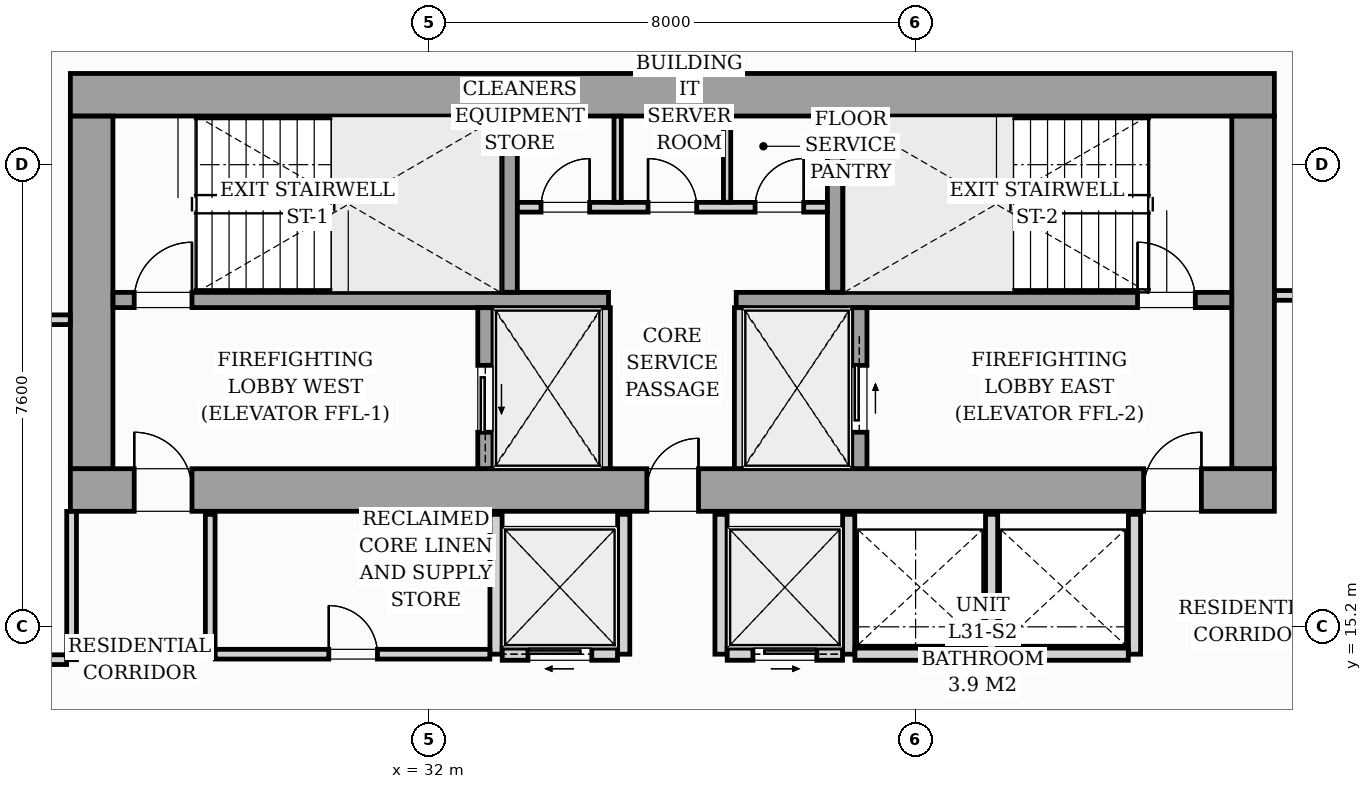
"""IFC4 building model, lengths in metres.
Left out: names, types, materials, properties, quantities, classifications, styles, units other than length and angle.
Written with IfcOpenShell. Run it as: python <this file> out.ifc"""

import sys

from ifc_helpers import new_model, si_unit, direction, frame, frame_2d, origin, origin_2d, place, context, subcontext, project, spatial, rectangle, i_section, extrude, source, transform, mapped, element, fill, save


model = new_model("IFC4")
c1 = context("Model", 3, precision=1e-05, world=origin(), true_north=direction((0.0, 1.0)))
c2 = subcontext(c1, "Body", "Model", "MODEL_VIEW")
j1 = project(units=[si_unit("LENGTHUNIT", "METRE"), si_unit("PLANEANGLEUNIT", "RADIAN")], contexts=[c1])
p1 = place(None, origin())
s1 = spatial("IfcSite", under=j1, at=p1, CompositionType="ELEMENT")
p2 = place(p1, origin())
s2 = spatial("IfcBuilding", under=s1, at=p2, CompositionType="ELEMENT")
p3 = place(p2, frame((0.0, 0.0, 109.8)))
s3 = spatial("IfcBuildingStorey", under=s2, at=p3, CompositionType="ELEMENT", Elevation=109.8)
m1 = source(origin(), c2, "Body", "SweptSolid", [
    extrude(i_section(OverallWidth=0.427, OverallDepth=0.483, WebThickness=0.051, FlangeThickness=0.082, FilletRadius=0.018, at=origin_2d()), origin(), (0.0, 0.0, 1.0), 3.196),
])
for number, where, z_axis, x_axis in (
    (1, (26.4, 17.4, 0.002), (0.0, 0.0, 1.0), (1.0, 0.0, 0.0)),
    (2, (33.12, 17.4, 0.002), (0.0, 0.0, 1.0), (1.0, 0.0, 0.0)),
    (3, (38.88, 17.4, 0.002), (0.0, 0.0, 1.0), (1.0, 0.0, 0.0)),
    (4, (45.6, 17.4, 0.002), (0.0, 0.0, 1.0), (1.0, 0.0, 0.0)),
    (5, (26.4, 24.0, 0.002), (0.0, 0.0, 1.0), (1.0, 0.0, 0.0)),
    (6, (33.12, 24.0, 0.002), (0.0, 0.0, 1.0), (1.0, 0.0, 0.0)),
    (7, (38.88, 24.0, 0.002), (0.0, 0.0, 1.0), (1.0, 0.0, 0.0)),
    (8, (45.6, 24.0, 0.002), (0.0, 0.0, 1.0), (1.0, 0.0, 0.0)),
):
    element("IfcColumn", number, at=place(p3, frame(where, z_axis=z_axis, x_axis=x_axis)), inside=s3, PredefinedType="PILASTER", context=c2, shape_type="MappedRepresentation", body=[
        mapped(m1, transform((0.0, 0.0, 0.0), scale=1.0)),
    ])
p4 = place(p3, frame((11.08, 23.508, 0.0), z_axis=(0.0, 0.0, 1.0), x_axis=(0.995396638587, 0.095841180552, 0.0)))
e9 = element("IfcWall", 9, at=p4, inside=s3, PredefinedType="STANDARD", context=c2, shape_type="SweptSolid", body=[
    extrude(rectangle(XDim=19.11, YDim=0.26, at=frame_2d((9.555, 0.0))), origin(), (0.0, 0.0, 1.0), 2.94),
])
p5 = place(p4, frame((10.764, 0.0, 0.0)))
e10 = element("IfcOpeningElement", 10, at=p5, cuts=e9, PredefinedType="OPENING", context=c2, shape_type="SweptSolid", body=[
    extrude(rectangle(XDim=1.8, YDim=2.06, at=frame_2d((0.9, 1.03))), frame((0.0, 0.14, 0.0), z_axis=(0.0, -1.0, 0.0), x_axis=(1.0, 0.0, 0.0)), (0.0, 0.0, 1.0), 0.28),
])
p6 = place(p4, frame((2.05, 0.0, 0.65)))
e11 = element("IfcOpeningElement", 11, at=p6, cuts=e9, PredefinedType="OPENING", context=c2, shape_type="SweptSolid", body=[
    extrude(rectangle(XDim=1.6, YDim=1.5, at=frame_2d((0.8, 0.75))), frame((0.0, 0.14, 0.0), z_axis=(0.0, -1.0, 0.0), x_axis=(1.0, 0.0, 0.0)), (0.0, 0.0, 1.0), 0.28),
])
p7 = place(p3, frame((26.1, 17.45, 0.0), z_axis=(0.0, 0.0, 1.0), x_axis=(1.0, 0.0, 0.0)))
e12 = element("IfcWall", 12, at=p7, inside=s3, PredefinedType="SHEAR", context=c2, shape_type="SweptSolid", body=[
    extrude(rectangle(XDim=19.8, YDim=0.7, at=frame_2d((9.9, 0.0))), origin(), (0.0, 0.0, 1.0), 3.2),
])
p8 = place(p7, frame((1.05, 0.0, 0.0)))
e13 = element("IfcOpeningElement", 13, at=p8, cuts=e12, PredefinedType="OPENING", context=c2, shape_type="SweptSolid", body=[
    extrude(rectangle(XDim=0.95, YDim=2.06, at=frame_2d((0.475, 1.03))), frame((0.0, 0.36, 0.0), z_axis=(0.0, -1.0, 0.0), x_axis=(1.0, 0.0, 0.0)), (0.0, 0.0, 1.0), 0.72),
])
p9 = place(p7, frame((9.48, 0.0, 0.0)))
e14 = element("IfcOpeningElement", 14, at=p9, cuts=e12, PredefinedType="OPENING", context=c2, shape_type="SweptSolid", body=[
    extrude(rectangle(XDim=0.85, YDim=2.0, at=frame_2d((0.425, 1.0))), frame((0.0, 0.36, 0.0), z_axis=(0.0, -1.0, 0.0), x_axis=(1.0, 0.0, 0.0)), (0.0, 0.0, 1.0), 0.72),
])
p10 = place(p7, frame((17.65, 0.0, 0.0)))
e15 = element("IfcOpeningElement", 15, at=p10, cuts=e12, PredefinedType="OPENING", context=c2, shape_type="SweptSolid", body=[
    extrude(rectangle(XDim=0.95, YDim=2.06, at=frame_2d((0.475, 1.03))), frame((0.0, 0.36, 0.0), z_axis=(0.0, -1.0, 0.0), x_axis=(1.0, 0.0, 0.0)), (0.0, 0.0, 1.0), 0.72),
])
p11 = place(p3, frame((26.1, 23.95, 0.0), z_axis=(0.0, 0.0, 1.0), x_axis=(1.0, 0.0, 0.0)))
e16 = element("IfcWall", 16, at=p11, inside=s3, PredefinedType="SHEAR", context=c2, shape_type="SweptSolid", body=[
    extrude(rectangle(XDim=19.8, YDim=0.7, at=frame_2d((9.9, 0.0))), origin(), (0.0, 0.0, 1.0), 3.2),
])
for number, where, z_axis, x_axis in (
    (17, (26.45, 17.802, 0.0), (0.0, 0.0, 1.0), (0.0, 1.0, 0.0)),
    (18, (45.55, 17.802, 0.0), (0.0, 0.0, 1.0), (0.0, 1.0, 0.0)),
):
    element("IfcWall", number, at=place(p3, frame(where, z_axis=z_axis, x_axis=x_axis)), inside=s3, PredefinedType="SHEAR", context=c2, shape_type="SweptSolid", body=[
        extrude(rectangle(XDim=5.796, YDim=0.7, at=frame_2d((2.898, 0.0))), origin(), (0.0, 0.0, 1.0), 3.2),
    ])
p12 = place(p3, frame((26.802, 20.575, 0.0), z_axis=(0.0, 0.0, 1.0), x_axis=(1.0, 0.0, 0.0)))
e19 = element("IfcWall", 19, at=p12, inside=s3, PredefinedType="SOLIDWALL", context=c2, shape_type="SweptSolid", body=[
    extrude(rectangle(XDim=8.148, YDim=0.25, at=frame_2d((4.074, 0.0))), origin(), (0.0, 0.0, 1.0), 3.2),
])
p13 = place(p12, frame((0.348, 0.0, 0.0)))
e20 = element("IfcOpeningElement", 20, at=p13, cuts=e19, PredefinedType="OPENING", context=c2, shape_type="SweptSolid", body=[
    extrude(rectangle(XDim=0.95, YDim=2.06, at=frame_2d((0.475, 1.03))), frame((0.0, 0.135, 0.0), z_axis=(0.0, -1.0, 0.0), x_axis=(1.0, 0.0, 0.0)), (0.0, 0.0, 1.0), 0.27),
])
p14 = place(p3, frame((37.05, 20.575, 0.0), z_axis=(0.0, 0.0, 1.0), x_axis=(1.0, 0.0, 0.0)))
e21 = element("IfcWall", 21, at=p14, inside=s3, PredefinedType="SOLIDWALL", context=c2, shape_type="SweptSolid", body=[
    extrude(rectangle(XDim=8.148, YDim=0.25, at=frame_2d((4.074, 0.0))), origin(), (0.0, 0.0, 1.0), 3.2),
])
p15 = place(p14, frame((6.6, 0.0, 0.0)))
e22 = element("IfcOpeningElement", 22, at=p15, cuts=e21, PredefinedType="OPENING", context=c2, shape_type="SweptSolid", body=[
    extrude(rectangle(XDim=0.95, YDim=2.06, at=frame_2d((0.475, 1.03))), frame((0.0, 0.135, 0.0), z_axis=(0.0, -1.0, 0.0), x_axis=(1.0, 0.0, 0.0)), (0.0, 0.0, 1.0), 0.27),
])
for number, where, z_axis, x_axis in (
    (23, (33.325, 20.702, 0.0), (0.0, 0.0, 1.0), (0.0, 1.0, 0.0)),
    (24, (38.675, 20.702, 0.0), (0.0, 0.0, 1.0), (0.0, 1.0, 0.0)),
):
    element("IfcWall", number, at=place(p3, frame(where, z_axis=z_axis, x_axis=x_axis)), inside=s3, PredefinedType="SOLIDWALL", context=c2, shape_type="SweptSolid", body=[
        extrude(rectangle(XDim=2.896, YDim=0.25, at=frame_2d((1.448, 0.0))), origin(), (0.0, 0.0, 1.0), 3.2),
    ])
p16 = place(p3, frame((32.925, 17.802, 0.0), z_axis=(0.0, 0.0, 1.0), x_axis=(0.0, 1.0, 0.0)))
e25 = element("IfcWall", 25, at=p16, inside=s3, PredefinedType="SOLIDWALL", context=c2, shape_type="SweptSolid", body=[
    extrude(rectangle(XDim=2.646, YDim=0.25, at=frame_2d((1.323, 0.0))), origin(), (0.0, 0.0, 1.0), 3.2),
])
p17 = place(p16, frame((0.598, 0.0, 0.0)))
e26 = element("IfcOpeningElement", 26, at=p17, cuts=e25, PredefinedType="OPENING", context=c2, shape_type="SweptSolid", body=[
    extrude(rectangle(XDim=1.1, YDim=2.08, at=frame_2d((0.55, 1.04))), frame((0.0, 0.135, 0.0), z_axis=(0.0, -1.0, 0.0), x_axis=(1.0, 0.0, 0.0)), (0.0, 0.0, 1.0), 0.27),
])
for number, where, z_axis, x_axis in (
    (27, (34.9, 17.802, 0.0), (0.0, 0.0, 1.0), (0.0, 1.0, 0.0)),
    (28, (37.1, 17.802, 0.0), (0.0, 0.0, 1.0), (0.0, 1.0, 0.0)),
):
    element("IfcWall", number, at=place(p3, frame(where, z_axis=z_axis, x_axis=x_axis)), inside=s3, PredefinedType="PARTITIONING", context=c2, shape_type="SweptSolid", body=[
        extrude(rectangle(XDim=2.646, YDim=0.16, at=frame_2d((1.323, 0.0))), origin(), (0.0, 0.0, 1.0), 2.94),
    ])
p18 = place(p3, frame((39.075, 17.802, 0.0), z_axis=(0.0, 0.0, 1.0), x_axis=(0.0, 1.0, 0.0)))
e29 = element("IfcWall", 29, at=p18, inside=s3, PredefinedType="SOLIDWALL", context=c2, shape_type="SweptSolid", body=[
    extrude(rectangle(XDim=2.646, YDim=0.25, at=frame_2d((1.323, 0.0))), origin(), (0.0, 0.0, 1.0), 3.2),
])
p19 = place(p18, frame((0.598, 0.0, 0.0)))
e30 = element("IfcOpeningElement", 30, at=p19, cuts=e29, PredefinedType="OPENING", context=c2, shape_type="SweptSolid", body=[
    extrude(rectangle(XDim=1.1, YDim=2.08, at=frame_2d((0.55, 1.04))), frame((0.0, 0.135, 0.0), z_axis=(0.0, -1.0, 0.0), x_axis=(1.0, 0.0, 0.0)), (0.0, 0.0, 1.0), 0.27),
])
p20 = place(p3, frame((33.452, 22.1, 0.0), z_axis=(0.0, 0.0, 1.0), x_axis=(1.0, 0.0, 0.0)))
e31 = element("IfcWall", 31, at=p20, inside=s3, PredefinedType="PARTITIONING", context=c2, shape_type="SweptSolid", body=[
    extrude(rectangle(XDim=5.096, YDim=0.16, at=frame_2d((2.548, 0.0))), origin(), (0.0, 0.0, 1.0), 2.94),
])
p21 = place(p20, frame((0.388, 0.0, 0.0)))
e32 = element("IfcOpeningElement", 32, at=p21, cuts=e31, PredefinedType="OPENING", context=c2, shape_type="SweptSolid", body=[
    extrude(rectangle(XDim=0.8, YDim=2.05, at=frame_2d((0.4, 1.025))), frame((0.0, 0.09, 0.0), z_axis=(0.0, -1.0, 0.0), x_axis=(1.0, 0.0, 0.0)), (0.0, 0.0, 1.0), 0.18),
])
p22 = place(p20, frame((2.148, 0.0, 0.0)))
e33 = element("IfcOpeningElement", 33, at=p22, cuts=e31, PredefinedType="OPENING", context=c2, shape_type="SweptSolid", body=[
    extrude(rectangle(XDim=0.8, YDim=2.05, at=frame_2d((0.4, 1.025))), frame((0.0, 0.09, 0.0), z_axis=(0.0, -1.0, 0.0), x_axis=(1.0, 0.0, 0.0)), (0.0, 0.0, 1.0), 0.18),
])
p23 = place(p20, frame((3.908, 0.0, 0.0)))
e34 = element("IfcOpeningElement", 34, at=p23, cuts=e31, PredefinedType="OPENING", context=c2, shape_type="SweptSolid", body=[
    extrude(rectangle(XDim=0.8, YDim=2.05, at=frame_2d((0.4, 1.025))), frame((0.0, 0.09, 0.0), z_axis=(0.0, -1.0, 0.0), x_axis=(1.0, 0.0, 0.0)), (0.0, 0.0, 1.0), 0.18),
])
for number, where, z_axis, x_axis in (
    (35, (35.1, 22.182, 0.0), (0.0, 0.0, 1.0), (0.0, 1.0, 0.0)),
    (36, (36.9, 22.182, 0.0), (0.0, 0.0, 1.0), (0.0, 1.0, 0.0)),
):
    element("IfcWall", number, at=place(p3, frame(where, z_axis=z_axis, x_axis=x_axis)), inside=s3, PredefinedType="PARTITIONING", context=c2, shape_type="SweptSolid", body=[
        extrude(rectangle(XDim=1.416, YDim=0.12, at=frame_2d((0.708, 0.0))), origin(), (0.0, 0.0, 1.0), 2.94),
    ])
p24 = place(p3, frame((28.4, 14.75, 0.0), z_axis=(0.0, 0.0, 1.0), x_axis=(0.0, 1.0, 0.0)))
e37 = element("IfcWall", 37, at=p24, inside=s3, PredefinedType="PARTITIONING", context=c2, shape_type="SweptSolid", body=[
    extrude(rectangle(XDim=2.3, YDim=0.16, at=frame_2d((1.15, 0.0))), origin(), (0.0, 0.0, 1.0), 2.94),
])
p25 = place(p3, frame((33.1, 14.75, 0.0), z_axis=(0.0, 0.0, 1.0), x_axis=(0.0, 1.0, 0.0)))
e38 = element("IfcWall", 38, at=p25, inside=s3, PredefinedType="PARTITIONING", context=c2, shape_type="SweptSolid", body=[
    extrude(rectangle(XDim=2.3, YDim=0.2, at=frame_2d((1.15, 0.0))), origin(), (0.0, 0.0, 1.0), 2.94),
])
p26 = place(p3, frame((28.482, 14.75, 0.0), z_axis=(0.0, 0.0, 1.0), x_axis=(1.0, 0.0, 0.0)))
e39 = element("IfcWall", 39, at=p26, inside=s3, PredefinedType="PARTITIONING", context=c2, shape_type="SweptSolid", body=[
    extrude(rectangle(XDim=4.516, YDim=0.16, at=frame_2d((2.258, 0.0))), origin(), (0.0, 0.0, 1.0), 2.94),
])
p27 = place(p26, frame((1.868, 0.0, 0.0)))
e40 = element("IfcOpeningElement", 40, at=p27, cuts=e39, PredefinedType="OPENING", context=c2, shape_type="SweptSolid", body=[
    extrude(rectangle(XDim=0.8, YDim=2.05, at=frame_2d((0.4, 1.025))), frame((0.0, 0.09, 0.0), z_axis=(0.0, -1.0, 0.0), x_axis=(1.0, 0.0, 0.0)), (0.0, 0.0, 1.0), 0.18),
])
p28 = place(p3, frame((35.2, 14.75, 0.0), z_axis=(0.0, 0.0, 1.0), x_axis=(0.0, 1.0, 0.0)))
e41 = element("IfcWall", 41, at=p28, inside=s3, PredefinedType="PARTITIONING", context=c2, shape_type="SweptSolid", body=[
    extrude(rectangle(XDim=2.3, YDim=0.2, at=frame_2d((1.15, 0.0))), origin(), (0.0, 0.0, 1.0), 2.94),
])
p29 = place(p3, frame((33.202, 14.75, 0.0), z_axis=(0.0, 0.0, 1.0), x_axis=(1.0, 0.0, 0.0)))
e42 = element("IfcWall", 42, at=p29, inside=s3, PredefinedType="PARTITIONING", context=c2, shape_type="SweptSolid", body=[
    extrude(rectangle(XDim=1.896, YDim=0.2, at=frame_2d((0.948, 0.0))), origin(), (0.0, 0.0, 1.0), 2.94),
])
p30 = place(p29, frame((0.423, 0.0, 0.0)))
e43 = element("IfcOpeningElement", 43, at=p30, cuts=e42, PredefinedType="OPENING", context=c2, shape_type="SweptSolid", body=[
    extrude(rectangle(XDim=1.05, YDim=2.08, at=frame_2d((0.525, 1.04))), frame((0.0, 0.11, 0.0), z_axis=(0.0, -1.0, 0.0), x_axis=(1.0, 0.0, 0.0)), (0.0, 0.0, 1.0), 0.22),
])
for number, where, z_axis, x_axis in (
    (44, (36.8, 14.75, 0.0), (0.0, 0.0, 1.0), (0.0, 1.0, 0.0)),
    (45, (38.9, 14.75, 0.0), (0.0, 0.0, 1.0), (0.0, 1.0, 0.0)),
):
    element("IfcWall", number, at=place(p3, frame(where, z_axis=z_axis, x_axis=x_axis)), inside=s3, PredefinedType="PARTITIONING", context=c2, shape_type="SweptSolid", body=[
        extrude(rectangle(XDim=2.3, YDim=0.2, at=frame_2d((1.15, 0.0))), origin(), (0.0, 0.0, 1.0), 2.94),
    ])
p31 = place(p3, frame((36.902, 14.75, 0.0), z_axis=(0.0, 0.0, 1.0), x_axis=(1.0, 0.0, 0.0)))
e46 = element("IfcWall", 46, at=p31, inside=s3, PredefinedType="PARTITIONING", context=c2, shape_type="SweptSolid", body=[
    extrude(rectangle(XDim=1.896, YDim=0.2, at=frame_2d((0.948, 0.0))), origin(), (0.0, 0.0, 1.0), 2.94),
])
p32 = place(p31, frame((0.423, 0.0, 0.0)))
e47 = element("IfcOpeningElement", 47, at=p32, cuts=e46, PredefinedType="OPENING", context=c2, shape_type="SweptSolid", body=[
    extrude(rectangle(XDim=1.05, YDim=2.08, at=frame_2d((0.525, 1.04))), frame((0.0, 0.11, 0.0), z_axis=(0.0, -1.0, 0.0), x_axis=(1.0, 0.0, 0.0)), (0.0, 0.0, 1.0), 0.22),
])
for number, where, z_axis, x_axis in (
    (48, (41.25, 14.75, 0.0), (0.0, 0.0, 1.0), (0.0, 1.0, 0.0)),
    (49, (43.6, 14.75, 0.0), (0.0, 0.0, 1.0), (0.0, 1.0, 0.0)),
):
    element("IfcWall", number, at=place(p3, frame(where, z_axis=z_axis, x_axis=x_axis)), inside=s3, PredefinedType="PARTITIONING", context=c2, shape_type="SweptSolid", body=[
        extrude(rectangle(XDim=2.3, YDim=0.2, at=frame_2d((1.15, 0.0))), origin(), (0.0, 0.0, 1.0), 2.94),
    ])
for number, where, z_axis, x_axis in (
    (50, (39.002, 14.75, 0.0), (0.0, 0.0, 1.0), (1.0, 0.0, 0.0)),
    (51, (41.352, 14.75, 0.0), (0.0, 0.0, 1.0), (1.0, 0.0, 0.0)),
):
    element("IfcWall", number, at=place(p3, frame(where, z_axis=z_axis, x_axis=x_axis)), inside=s3, PredefinedType="PARTITIONING", context=c2, shape_type="SweptSolid", body=[
        extrude(rectangle(XDim=2.146, YDim=0.2, at=frame_2d((1.073, 0.0))), origin(), (0.0, 0.0, 1.0), 2.94),
    ])
p33 = place(p3, frame((36.0, 24.302, 0.0), z_axis=(0.0, 0.0, 1.0), x_axis=(0.0, 1.0, 0.0)))
e52 = element("IfcWall", 52, at=p33, inside=s3, PredefinedType="PARTITIONING", context=c2, shape_type="SweptSolid", body=[
    extrude(rectangle(XDim=1.656, YDim=0.2, at=frame_2d((0.828, 0.0))), origin(), (0.0, 0.0, 1.0), 2.94),
])
p34 = place(p3, frame((45.902, 20.65, 0.0), z_axis=(0.0, 0.0, 1.0), x_axis=(1.0, 0.0, 0.0)))
e53 = element("IfcWall", 53, at=p34, inside=s3, PredefinedType="PARTITIONING", context=c2, shape_type="SweptSolid", body=[
    extrude(rectangle(XDim=1.716, YDim=0.16, at=frame_2d((0.858, 0.0))), origin(), (0.0, 0.0, 1.0), 2.94),
])
p35 = place(p3, frame((23.632, 20.25, 0.0), z_axis=(0.0, 0.0, 1.0), x_axis=(1.0, 0.0, 0.0)))
e54 = element("IfcWall", 54, at=p35, inside=s3, PredefinedType="PARTITIONING", context=c2, shape_type="SweptSolid", body=[
    extrude(rectangle(XDim=2.466, YDim=0.16, at=frame_2d((1.233, 0.0))), origin(), (0.0, 0.0, 1.0), 2.94),
])
p36 = place(p3, frame((26.12, 14.66, 0.0), z_axis=(0.0, 0.0, 1.0), x_axis=(0.0, 1.0, 0.0)))
e55 = element("IfcWall", 55, at=p36, inside=s3, PredefinedType="PARTITIONING", context=c2, shape_type="SweptSolid", body=[
    extrude(rectangle(XDim=2.438, YDim=0.16, at=frame_2d((1.219, 0.0))), origin(), (0.0, 0.0, 1.0), 2.94),
])
p37 = place(p3, frame((23.632, 14.66, 0.0), z_axis=(0.0, 0.0, 1.0), x_axis=(1.0, 0.0, 0.0)))
e56 = element("IfcWall", 56, at=p37, inside=s3, PredefinedType="PARTITIONING", context=c2, shape_type="SweptSolid", body=[
    extrude(rectangle(XDim=2.406, YDim=0.16, at=frame_2d((1.203, 0.0))), origin(), (0.0, 0.0, 1.0), 2.94),
])
m2 = source(origin(), c2, "Body", "SweptSolid", [
    extrude(rectangle(XDim=0.95, YDim=2.06, at=frame_2d((0.475, 1.03))), frame((0.0, 0.025, 0.0), z_axis=(0.0, -1.0, 0.0), x_axis=(1.0, 0.0, 0.0)), (0.0, 0.0, 1.0), 0.05),
])
p38 = place(p8, origin())
e57 = element("IfcDoor", 57, at=p38, inside=s3, OperationType="SINGLE_SWING_LEFT", PredefinedType="DOOR", context=c2, shape_type="MappedRepresentation", body=[
    mapped(m2, transform((0.0, 0.0, 0.0), scale=1.0)),
])
fill(e13, e57)
m3 = source(origin(), c2, "Body", "SweptSolid", [
    extrude(rectangle(XDim=0.85, YDim=2.0, at=frame_2d((0.425, 1.0))), frame((0.0, 0.025, 0.0), z_axis=(0.0, -1.0, 0.0), x_axis=(1.0, 0.0, 0.0)), (0.0, 0.0, 1.0), 0.05),
])
p39 = place(p9, origin())
e58 = element("IfcDoor", 58, at=p39, inside=s3, OperationType="SINGLE_SWING_RIGHT", PredefinedType="DOOR", context=c2, shape_type="MappedRepresentation", body=[
    mapped(m3, transform((0.0, 0.0, 0.0), scale=1.0)),
])
fill(e14, e58)
p40 = place(p10, origin())
e59 = element("IfcDoor", 59, at=p40, inside=s3, OperationType="SINGLE_SWING_RIGHT", PredefinedType="DOOR", context=c2, shape_type="MappedRepresentation", body=[
    mapped(m2, transform((0.0, 0.0, 0.0), scale=1.0)),
])
fill(e15, e59)
p41 = place(p13, origin())
e60 = element("IfcDoor", 60, at=p41, inside=s3, OperationType="SINGLE_SWING_RIGHT", PredefinedType="DOOR", context=c2, shape_type="MappedRepresentation", body=[
    mapped(m2, transform((0.0, 0.0, 0.0), scale=1.0)),
])
fill(e20, e60)
p42 = place(p15, origin())
e61 = element("IfcDoor", 61, at=p42, inside=s3, OperationType="SINGLE_SWING_LEFT", PredefinedType="DOOR", context=c2, shape_type="MappedRepresentation", body=[
    mapped(m2, transform((0.0, 0.0, 0.0), scale=1.0)),
])
fill(e22, e61)
m4 = source(origin(), c2, "Body", "SweptSolid", [
    extrude(rectangle(XDim=1.1, YDim=2.08, at=frame_2d((0.55, 1.04))), frame((0.0, 0.025, 0.0), z_axis=(0.0, -1.0, 0.0), x_axis=(1.0, 0.0, 0.0)), (0.0, 0.0, 1.0), 0.05),
])
p43 = place(p17, origin())
e62 = element("IfcDoor", 62, at=p43, inside=s3, OperationType="SLIDING_TO_LEFT", PredefinedType="DOOR", context=c2, shape_type="MappedRepresentation", body=[
    mapped(m4, transform((0.0, 0.0, 0.0), scale=1.0)),
])
fill(e26, e62)
p44 = place(p19, origin())
e63 = element("IfcDoor", 63, at=p44, inside=s3, OperationType="SLIDING_TO_RIGHT", PredefinedType="DOOR", context=c2, shape_type="MappedRepresentation", body=[
    mapped(m4, transform((0.0, 0.0, 0.0), scale=1.0)),
])
fill(e30, e63)
m5 = source(origin(), c2, "Body", "SweptSolid", [
    extrude(rectangle(XDim=0.8, YDim=2.05, at=frame_2d((0.4, 1.025))), frame((0.0, 0.025, 0.0), z_axis=(0.0, -1.0, 0.0), x_axis=(1.0, 0.0, 0.0)), (0.0, 0.0, 1.0), 0.05),
])
p45 = place(p21, origin())
e64 = element("IfcDoor", 64, at=p45, inside=s3, OperationType="SINGLE_SWING_RIGHT", PredefinedType="DOOR", context=c2, shape_type="MappedRepresentation", body=[
    mapped(m5, transform((0.0, 0.0, 0.0), scale=1.0)),
])
fill(e32, e64)
p46 = place(p22, origin())
e65 = element("IfcDoor", 65, at=p46, inside=s3, OperationType="SINGLE_SWING_LEFT", PredefinedType="DOOR", context=c2, shape_type="MappedRepresentation", body=[
    mapped(m5, transform((0.0, 0.0, 0.0), scale=1.0)),
])
fill(e33, e65)
p47 = place(p23, origin())
e66 = element("IfcDoor", 66, at=p47, inside=s3, OperationType="SINGLE_SWING_RIGHT", PredefinedType="DOOR", context=c2, shape_type="MappedRepresentation", body=[
    mapped(m5, transform((0.0, 0.0, 0.0), scale=1.0)),
])
fill(e34, e66)
p48 = place(p27, origin())
e67 = element("IfcDoor", 67, at=p48, inside=s3, OperationType="SINGLE_SWING_LEFT", PredefinedType="DOOR", context=c2, shape_type="MappedRepresentation", body=[
    mapped(m5, transform((0.0, 0.0, 0.0), scale=1.0)),
])
fill(e40, e67)
m6 = source(origin(), c2, "Body", "SweptSolid", [
    extrude(rectangle(XDim=1.05, YDim=2.08, at=frame_2d((0.525, 1.04))), frame((0.0, 0.025, 0.0), z_axis=(0.0, -1.0, 0.0), x_axis=(1.0, 0.0, 0.0)), (0.0, 0.0, 1.0), 0.05),
])
p49 = place(p30, origin())
e68 = element("IfcDoor", 68, at=p49, inside=s3, OperationType="SLIDING_TO_LEFT", PredefinedType="DOOR", context=c2, shape_type="MappedRepresentation", body=[
    mapped(m6, transform((0.0, 0.0, 0.0), scale=1.0)),
])
fill(e43, e68)
p50 = place(p32, origin())
e69 = element("IfcDoor", 69, at=p50, inside=s3, OperationType="SLIDING_TO_RIGHT", PredefinedType="DOOR", context=c2, shape_type="MappedRepresentation", body=[
    mapped(m6, transform((0.0, 0.0, 0.0), scale=1.0)),
])
fill(e47, e69)
save(model, sys.argv[1])
